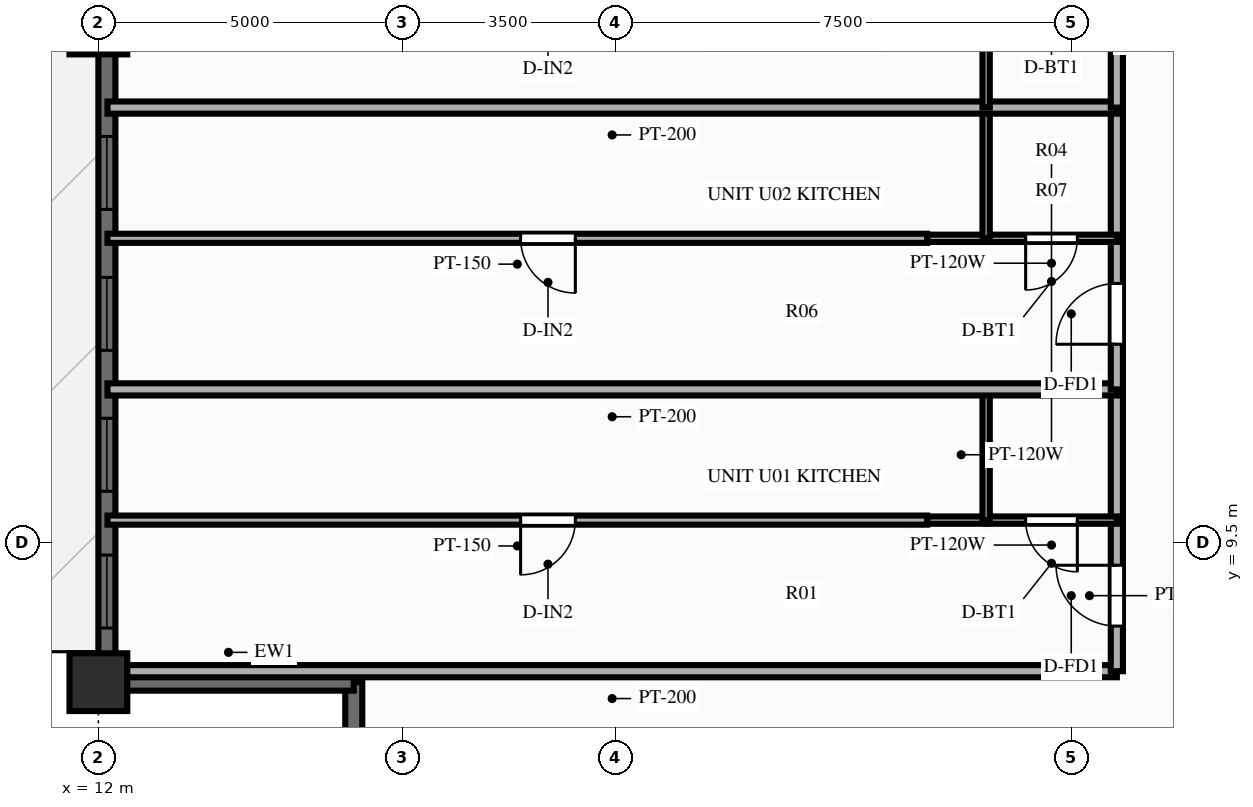
"""IFC4 building model, lengths in metres.
Left out: names, types, materials, properties, quantities, classifications, styles, units other than length and angle.
Written with IfcOpenShell. Run it as: python <this file> out.ifc"""

import sys

from ifc_helpers import new_model, si_unit, direction, frame, frame_2d, origin, origin_2d, place, context, subcontext, project, spatial, rectangle, extrude, source, transform, mapped, element, fill, save


model = new_model("IFC4")
c1 = context("Model", 3, precision=1e-05, world=origin(), true_north=direction((0.0, 1.0)))
c2 = subcontext(c1, "Body", "Model", "MODEL_VIEW")
j1 = project(units=[si_unit("LENGTHUNIT", "METRE"), si_unit("PLANEANGLEUNIT", "RADIAN")], contexts=[c1])
p1 = place(None, origin())
s1 = spatial("IfcSite", under=j1, at=p1, CompositionType="ELEMENT")
p2 = place(p1, origin())
s2 = spatial("IfcBuilding", under=s1, at=p2, CompositionType="ELEMENT")
p3 = place(p2, frame((0.0, 0.0, 122.85)))
s3 = spatial("IfcBuildingStorey", under=s2, at=p3, CompositionType="ELEMENT", Elevation=122.85)
m1 = source(origin(), c2, "Body", "SweptSolid", [
    extrude(rectangle(XDim=0.95, YDim=0.95, at=origin_2d()), origin(), (0.0, 0.0, 1.0), 3.9),
])
for number, where, z_axis, x_axis in (
    (1, (12.0, 18.0, 0.0), (0.0, 0.0, 1.0), (1.0, 0.0, 0.0)),
    (2, (12.0, 7.2, 0.0), (0.0, 0.0, 1.0), (1.0, 0.0, 0.0)),
):
    element("IfcColumn", number, at=place(p3, frame(where, z_axis=z_axis, x_axis=x_axis)), inside=s3, PredefinedType="COLUMN", context=c2, shape_type="MappedRepresentation", body=[
        mapped(m1, transform((0.0, 0.0, 0.0), scale=1.0)),
    ])
p4 = place(p3, frame((12.14, 7.2, 0.0), z_axis=(0.0, 0.0, 1.0), x_axis=(0.0, 1.0, 0.0)))
e3 = element("IfcWall", 3, at=p4, inside=s3, PredefinedType="SOLIDWALL", context=c2, shape_type="SweptSolid", body=[
    extrude(rectangle(XDim=39.6, YDim=0.28, at=frame_2d((19.8, 0.0))), origin(), (0.0, 0.0, 1.0), 2.24),
])
p5 = place(p4, frame((0.89, 0.0, 0.25)))
e4 = element("IfcOpeningElement", 4, at=p5, cuts=e3, PredefinedType="OPENING", context=c2, shape_type="SweptSolid", body=[
    extrude(rectangle(XDim=1.2, YDim=1.5, at=frame_2d((0.6, 0.75))), frame((0.0, 0.152, 0.0), z_axis=(0.0, -1.0, 0.0), x_axis=(1.0, 0.0, 0.0)), (0.0, 0.0, 1.0), 0.304),
])
p6 = place(p4, frame((3.14, 0.0, 0.25)))
e5 = element("IfcOpeningElement", 5, at=p6, cuts=e3, PredefinedType="OPENING", context=c2, shape_type="SweptSolid", body=[
    extrude(rectangle(XDim=1.2, YDim=1.5, at=frame_2d((0.6, 0.75))), frame((0.0, 0.152, 0.0), z_axis=(0.0, -1.0, 0.0), x_axis=(1.0, 0.0, 0.0)), (0.0, 0.0, 1.0), 0.304),
])
p7 = place(p4, frame((5.458, 0.0, 0.25)))
e6 = element("IfcOpeningElement", 6, at=p7, cuts=e3, PredefinedType="OPENING", context=c2, shape_type="SweptSolid", body=[
    extrude(rectangle(XDim=1.2, YDim=1.5, at=frame_2d((0.6, 0.75))), frame((0.0, 0.152, 0.0), z_axis=(0.0, -1.0, 0.0), x_axis=(1.0, 0.0, 0.0)), (0.0, 0.0, 1.0), 0.304),
])
p8 = place(p4, frame((7.775, 0.0, 0.25)))
e7 = element("IfcOpeningElement", 7, at=p8, cuts=e3, PredefinedType="OPENING", context=c2, shape_type="SweptSolid", body=[
    extrude(rectangle(XDim=1.2, YDim=1.5, at=frame_2d((0.6, 0.75))), frame((0.0, 0.152, 0.0), z_axis=(0.0, -1.0, 0.0), x_axis=(1.0, 0.0, 0.0)), (0.0, 0.0, 1.0), 0.304),
])
p9 = place(p4, frame((12.242, 0.0, 0.25)))
e8 = element("IfcOpeningElement", 8, at=p9, cuts=e3, PredefinedType="OPENING", context=c2, shape_type="SweptSolid", body=[
    extrude(rectangle(XDim=1.2, YDim=1.5, at=frame_2d((0.6, 0.75))), frame((0.0, 0.152, 0.0), z_axis=(0.0, -1.0, 0.0), x_axis=(1.0, 0.0, 0.0)), (0.0, 0.0, 1.0), 0.304),
])
p10 = place(p4, frame((14.56, 0.0, 0.25)))
e9 = element("IfcOpeningElement", 9, at=p10, cuts=e3, PredefinedType="OPENING", context=c2, shape_type="SweptSolid", body=[
    extrude(rectangle(XDim=1.2, YDim=1.5, at=frame_2d((0.6, 0.75))), frame((0.0, 0.152, 0.0), z_axis=(0.0, -1.0, 0.0), x_axis=(1.0, 0.0, 0.0)), (0.0, 0.0, 1.0), 0.304),
])
p11 = place(p4, frame((16.877, 0.0, 0.25)))
e10 = element("IfcOpeningElement", 10, at=p11, cuts=e3, PredefinedType="OPENING", context=c2, shape_type="SweptSolid", body=[
    extrude(rectangle(XDim=1.2, YDim=1.5, at=frame_2d((0.6, 0.75))), frame((0.0, 0.152, 0.0), z_axis=(0.0, -1.0, 0.0), x_axis=(1.0, 0.0, 0.0)), (0.0, 0.0, 1.0), 0.304),
])
p12 = place(p4, frame((19.25, 0.0, 0.0)))
e11 = element("IfcOpeningElement", 11, at=p12, cuts=e3, PredefinedType="OPENING", context=c2, shape_type="SweptSolid", body=[
    extrude(rectangle(XDim=1.1, YDim=2.15, at=frame_2d((0.55, 1.075))), frame((0.0, 0.152, 0.0), z_axis=(0.0, -1.0, 0.0), x_axis=(1.0, 0.0, 0.0)), (0.0, 0.0, 1.0), 0.304),
])
p13 = place(p4, frame((21.522, 0.0, 0.25)))
e12 = element("IfcOpeningElement", 12, at=p13, cuts=e3, PredefinedType="OPENING", context=c2, shape_type="SweptSolid", body=[
    extrude(rectangle(XDim=1.2, YDim=1.5, at=frame_2d((0.6, 0.75))), frame((0.0, 0.152, 0.0), z_axis=(0.0, -1.0, 0.0), x_axis=(1.0, 0.0, 0.0)), (0.0, 0.0, 1.0), 0.304),
])
p14 = place(p4, frame((23.84, 0.0, 0.25)))
e13 = element("IfcOpeningElement", 13, at=p14, cuts=e3, PredefinedType="OPENING", context=c2, shape_type="SweptSolid", body=[
    extrude(rectangle(XDim=1.2, YDim=1.5, at=frame_2d((0.6, 0.75))), frame((0.0, 0.152, 0.0), z_axis=(0.0, -1.0, 0.0), x_axis=(1.0, 0.0, 0.0)), (0.0, 0.0, 1.0), 0.304),
])
p15 = place(p4, frame((26.157, 0.0, 0.25)))
e14 = element("IfcOpeningElement", 14, at=p15, cuts=e3, PredefinedType="OPENING", context=c2, shape_type="SweptSolid", body=[
    extrude(rectangle(XDim=1.2, YDim=1.5, at=frame_2d((0.6, 0.75))), frame((0.0, 0.152, 0.0), z_axis=(0.0, -1.0, 0.0), x_axis=(1.0, 0.0, 0.0)), (0.0, 0.0, 1.0), 0.304),
])
p16 = place(p4, frame((30.625, 0.0, 0.25)))
e15 = element("IfcOpeningElement", 15, at=p16, cuts=e3, PredefinedType="OPENING", context=c2, shape_type="SweptSolid", body=[
    extrude(rectangle(XDim=1.2, YDim=1.5, at=frame_2d((0.6, 0.75))), frame((0.0, 0.152, 0.0), z_axis=(0.0, -1.0, 0.0), x_axis=(1.0, 0.0, 0.0)), (0.0, 0.0, 1.0), 0.304),
])
p17 = place(p4, frame((32.942, 0.0, 0.25)))
e16 = element("IfcOpeningElement", 16, at=p17, cuts=e3, PredefinedType="OPENING", context=c2, shape_type="SweptSolid", body=[
    extrude(rectangle(XDim=1.2, YDim=1.5, at=frame_2d((0.6, 0.75))), frame((0.0, 0.152, 0.0), z_axis=(0.0, -1.0, 0.0), x_axis=(1.0, 0.0, 0.0)), (0.0, 0.0, 1.0), 0.304),
])
p18 = place(p4, frame((35.26, 0.0, 0.25)))
e17 = element("IfcOpeningElement", 17, at=p18, cuts=e3, PredefinedType="OPENING", context=c2, shape_type="SweptSolid", body=[
    extrude(rectangle(XDim=1.2, YDim=1.5, at=frame_2d((0.6, 0.75))), frame((0.0, 0.152, 0.0), z_axis=(0.0, -1.0, 0.0), x_axis=(1.0, 0.0, 0.0)), (0.0, 0.0, 1.0), 0.304),
])
p19 = place(p4, frame((37.51, 0.0, 0.25)))
e18 = element("IfcOpeningElement", 18, at=p19, cuts=e3, PredefinedType="OPENING", context=c2, shape_type="SweptSolid", body=[
    extrude(rectangle(XDim=1.2, YDim=1.5, at=frame_2d((0.6, 0.75))), frame((0.0, 0.152, 0.0), z_axis=(0.0, -1.0, 0.0), x_axis=(1.0, 0.0, 0.0)), (0.0, 0.0, 1.0), 0.304),
])
for number, where, z_axis, x_axis in (
    (19, (16.2, 3.08, 0.0), (0.0, 0.0, 1.0), (0.0, 1.0, 0.0)),
    (20, (12.08, 7.2, 0.0), (0.0, 0.0, 1.0), (1.0, 0.0, 0.0)),
):
    element("IfcWall", number, at=place(p3, frame(where, z_axis=z_axis, x_axis=x_axis)), inside=s3, PredefinedType="SOLIDWALL", context=c2, shape_type="SweptSolid", body=[
        extrude(rectangle(XDim=4.12, YDim=0.28, at=frame_2d((2.06, 0.0))), origin(), (0.0, 0.0, 1.0), 2.24),
    ])
p20 = place(p3, frame((28.75, 7.38, 0.0), z_axis=(0.0, 0.0, 1.0), x_axis=(-1.0, 0.0, 0.0)))
e21 = element("IfcWall", 21, at=p20, inside=s3, PredefinedType="PARTITIONING", context=c2, shape_type="SweptSolid", body=[
    extrude(rectangle(XDim=16.6, YDim=0.2, at=frame_2d((8.3, 0.0))), origin(), (0.0, 0.0, 1.0), 3.56),
])
p21 = place(p3, frame((28.75, 7.38, 0.0), z_axis=(0.0, 0.0, 1.0), x_axis=(0.0, 1.0, 0.0)))
e22 = element("IfcWall", 22, at=p21, inside=s3, PredefinedType="PARTITIONING", context=c2, shape_type="SweptSolid", body=[
    extrude(rectangle(XDim=2.485, YDim=0.2, at=frame_2d((1.243, 0.0))), origin(), (0.0, 0.0, 1.0), 3.56),
])
p22 = place(p21, frame((0.742, 0.0, 0.0)))
e23 = element("IfcOpeningElement", 23, at=p22, cuts=e22, PredefinedType="OPENING", context=c2, shape_type="SweptSolid", body=[
    extrude(rectangle(XDim=1.0, YDim=2.15, at=frame_2d((0.5, 1.075))), frame((0.0, 0.112, 0.0), z_axis=(0.0, -1.0, 0.0), x_axis=(1.0, 0.0, 0.0)), (0.0, 0.0, 1.0), 0.224),
])
p23 = place(p3, frame((28.75, 9.865, 0.0), z_axis=(0.0, 0.0, 1.0), x_axis=(0.0, 1.0, 0.0)))
e24 = element("IfcWall", 24, at=p23, inside=s3, PredefinedType="PARTITIONING", context=c2, shape_type="SweptSolid", body=[
    extrude(rectangle(XDim=2.15, YDim=0.2, at=frame_2d((1.075, 0.0))), origin(), (0.0, 0.0, 1.0), 3.56),
])
p24 = place(p3, frame((28.75, 9.865, 0.0), z_axis=(0.0, 0.0, 1.0), x_axis=(-1.0, 0.0, 0.0)))
e25 = element("IfcWall", 25, at=p24, inside=s3, PredefinedType="PARTITIONING", context=c2, shape_type="SweptSolid", body=[
    extrude(rectangle(XDim=2.15, YDim=0.12, at=frame_2d((1.075, 0.0))), origin(), (0.0, 0.0, 1.0), 3.56),
])
p25 = place(p24, frame((0.65, 0.0, 0.0)))
e26 = element("IfcOpeningElement", 26, at=p25, cuts=e25, PredefinedType="OPENING", context=c2, shape_type="SweptSolid", body=[
    extrude(rectangle(XDim=0.85, YDim=2.05, at=frame_2d((0.425, 1.025))), frame((0.0, 0.072, 0.0), z_axis=(0.0, -1.0, 0.0), x_axis=(1.0, 0.0, 0.0)), (0.0, 0.0, 1.0), 0.144),
])
p26 = place(p3, frame((26.6, 9.865, 0.0), z_axis=(0.0, 0.0, 1.0), x_axis=(-1.0, 0.0, 0.0)))
e27 = element("IfcWall", 27, at=p26, inside=s3, PredefinedType="PARTITIONING", context=c2, shape_type="SweptSolid", body=[
    extrude(rectangle(XDim=0.97, YDim=0.12, at=frame_2d((0.485, 0.0))), origin(), (0.0, 0.0, 1.0), 3.56),
])
p27 = place(p3, frame((26.6, 9.865, 0.0), z_axis=(0.0, 0.0, 1.0), x_axis=(0.0, 1.0, 0.0)))
e28 = element("IfcWall", 28, at=p27, inside=s3, PredefinedType="PARTITIONING", context=c2, shape_type="SweptSolid", body=[
    extrude(rectangle(XDim=2.15, YDim=0.12, at=frame_2d((1.075, 0.0))), origin(), (0.0, 0.0, 1.0), 3.56),
])
p28 = place(p3, frame((25.63, 9.865, 0.0), z_axis=(0.0, 0.0, 1.0), x_axis=(-1.0, 0.0, 0.0)))
e29 = element("IfcWall", 29, at=p28, inside=s3, PredefinedType="PARTITIONING", context=c2, shape_type="SweptSolid", body=[
    extrude(rectangle(XDim=13.48, YDim=0.15, at=frame_2d((6.74, 0.0))), origin(), (0.0, 0.0, 1.0), 3.56),
])
p29 = place(p28, frame((5.786, 0.0, 0.0)))
e30 = element("IfcOpeningElement", 30, at=p29, cuts=e29, PredefinedType="OPENING", context=c2, shape_type="SweptSolid", body=[
    extrude(rectangle(XDim=0.9, YDim=2.1, at=frame_2d((0.45, 1.05))), frame((0.0, 0.087, 0.0), z_axis=(0.0, -1.0, 0.0), x_axis=(1.0, 0.0, 0.0)), (0.0, 0.0, 1.0), 0.174),
])
p30 = place(p3, frame((28.75, 12.015, 0.0), z_axis=(0.0, 0.0, 1.0), x_axis=(-1.0, 0.0, 0.0)))
e31 = element("IfcWall", 31, at=p30, inside=s3, PredefinedType="PARTITIONING", context=c2, shape_type="SweptSolid", body=[
    extrude(rectangle(XDim=16.6, YDim=0.2, at=frame_2d((8.3, 0.0))), origin(), (0.0, 0.0, 1.0), 3.56),
])
p31 = place(p3, frame((28.75, 12.015, 0.0), z_axis=(0.0, 0.0, 1.0), x_axis=(0.0, 1.0, 0.0)))
e32 = element("IfcWall", 32, at=p31, inside=s3, PredefinedType="PARTITIONING", context=c2, shape_type="SweptSolid", body=[
    extrude(rectangle(XDim=2.485, YDim=0.2, at=frame_2d((1.243, 0.0))), origin(), (0.0, 0.0, 1.0), 3.56),
])
p32 = place(p31, frame((0.742, 0.0, 0.0)))
e33 = element("IfcOpeningElement", 33, at=p32, cuts=e32, PredefinedType="OPENING", context=c2, shape_type="SweptSolid", body=[
    extrude(rectangle(XDim=1.0, YDim=2.15, at=frame_2d((0.5, 1.075))), frame((0.0, 0.112, 0.0), z_axis=(0.0, -1.0, 0.0), x_axis=(1.0, 0.0, 0.0)), (0.0, 0.0, 1.0), 0.224),
])
p33 = place(p3, frame((28.75, 14.5, 0.0), z_axis=(0.0, 0.0, 1.0), x_axis=(0.0, 1.0, 0.0)))
e34 = element("IfcWall", 34, at=p33, inside=s3, PredefinedType="PARTITIONING", context=c2, shape_type="SweptSolid", body=[
    extrude(rectangle(XDim=2.15, YDim=0.2, at=frame_2d((1.075, 0.0))), origin(), (0.0, 0.0, 1.0), 3.56),
])
p34 = place(p3, frame((28.75, 14.5, 0.0), z_axis=(0.0, 0.0, 1.0), x_axis=(-1.0, 0.0, 0.0)))
e35 = element("IfcWall", 35, at=p34, inside=s3, PredefinedType="PARTITIONING", context=c2, shape_type="SweptSolid", body=[
    extrude(rectangle(XDim=2.15, YDim=0.12, at=frame_2d((1.075, 0.0))), origin(), (0.0, 0.0, 1.0), 3.56),
])
p35 = place(p34, frame((0.65, 0.0, 0.0)))
e36 = element("IfcOpeningElement", 36, at=p35, cuts=e35, PredefinedType="OPENING", context=c2, shape_type="SweptSolid", body=[
    extrude(rectangle(XDim=0.85, YDim=2.05, at=frame_2d((0.425, 1.025))), frame((0.0, 0.072, 0.0), z_axis=(0.0, -1.0, 0.0), x_axis=(1.0, 0.0, 0.0)), (0.0, 0.0, 1.0), 0.144),
])
p36 = place(p3, frame((26.6, 14.5, 0.0), z_axis=(0.0, 0.0, 1.0), x_axis=(-1.0, 0.0, 0.0)))
e37 = element("IfcWall", 37, at=p36, inside=s3, PredefinedType="PARTITIONING", context=c2, shape_type="SweptSolid", body=[
    extrude(rectangle(XDim=0.97, YDim=0.12, at=frame_2d((0.485, 0.0))), origin(), (0.0, 0.0, 1.0), 3.56),
])
p37 = place(p3, frame((26.6, 14.5, 0.0), z_axis=(0.0, 0.0, 1.0), x_axis=(0.0, 1.0, 0.0)))
e38 = element("IfcWall", 38, at=p37, inside=s3, PredefinedType="PARTITIONING", context=c2, shape_type="SweptSolid", body=[
    extrude(rectangle(XDim=2.15, YDim=0.12, at=frame_2d((1.075, 0.0))), origin(), (0.0, 0.0, 1.0), 3.56),
])
p38 = place(p3, frame((25.63, 14.5, 0.0), z_axis=(0.0, 0.0, 1.0), x_axis=(-1.0, 0.0, 0.0)))
e39 = element("IfcWall", 39, at=p38, inside=s3, PredefinedType="PARTITIONING", context=c2, shape_type="SweptSolid", body=[
    extrude(rectangle(XDim=13.48, YDim=0.15, at=frame_2d((6.74, 0.0))), origin(), (0.0, 0.0, 1.0), 3.56),
])
p39 = place(p38, frame((5.786, 0.0, 0.0)))
e40 = element("IfcOpeningElement", 40, at=p39, cuts=e39, PredefinedType="OPENING", context=c2, shape_type="SweptSolid", body=[
    extrude(rectangle(XDim=0.9, YDim=2.1, at=frame_2d((0.45, 1.05))), frame((0.0, 0.087, 0.0), z_axis=(0.0, -1.0, 0.0), x_axis=(1.0, 0.0, 0.0)), (0.0, 0.0, 1.0), 0.174),
])
p40 = place(p3, frame((28.75, 16.65, 0.0), z_axis=(0.0, 0.0, 1.0), x_axis=(-1.0, 0.0, 0.0)))
e41 = element("IfcWall", 41, at=p40, inside=s3, PredefinedType="PARTITIONING", context=c2, shape_type="SweptSolid", body=[
    extrude(rectangle(XDim=16.6, YDim=0.2, at=frame_2d((8.3, 0.0))), origin(), (0.0, 0.0, 1.0), 3.56),
])
p41 = place(p3, frame((28.75, 16.65, 0.0), z_axis=(0.0, 0.0, 1.0), x_axis=(0.0, 1.0, 0.0)))
e42 = element("IfcWall", 42, at=p41, inside=s3, PredefinedType="PARTITIONING", context=c2, shape_type="SweptSolid", body=[
    extrude(rectangle(XDim=2.15, YDim=0.2, at=frame_2d((1.075, 0.0))), origin(), (0.0, 0.0, 1.0), 3.56),
])
p42 = place(p3, frame((26.6, 16.65, 0.0), z_axis=(0.0, 0.0, 1.0), x_axis=(0.0, 1.0, 0.0)))
e43 = element("IfcWall", 43, at=p42, inside=s3, PredefinedType="PARTITIONING", context=c2, shape_type="SweptSolid", body=[
    extrude(rectangle(XDim=2.15, YDim=0.12, at=frame_2d((1.075, 0.0))), origin(), (0.0, 0.0, 1.0), 3.56),
])
m2 = source(origin(), c2, "Body", "SweptSolid", [
    extrude(rectangle(XDim=1.2, YDim=1.5, at=frame_2d((0.6, 0.75))), frame((0.0, 0.03, 0.0), z_axis=(0.0, -1.0, 0.0), x_axis=(1.0, 0.0, 0.0)), (0.0, 0.0, 1.0), 0.06),
])
p43 = place(p5, origin())
e44 = element("IfcWindow", 44, at=p43, inside=s3, PartitioningType="SINGLE_PANEL", PredefinedType="WINDOW", context=c2, shape_type="MappedRepresentation", body=[
    mapped(m2, transform((0.0, 0.0, 0.0), scale=1.0)),
])
fill(e4, e44)
p44 = place(p6, origin())
e45 = element("IfcWindow", 45, at=p44, inside=s3, PartitioningType="SINGLE_PANEL", PredefinedType="WINDOW", context=c2, shape_type="MappedRepresentation", body=[
    mapped(m2, transform((0.0, 0.0, 0.0), scale=1.0)),
])
fill(e5, e45)
p45 = place(p7, origin())
e46 = element("IfcWindow", 46, at=p45, inside=s3, PartitioningType="SINGLE_PANEL", PredefinedType="WINDOW", context=c2, shape_type="MappedRepresentation", body=[
    mapped(m2, transform((0.0, 0.0, 0.0), scale=1.0)),
])
fill(e6, e46)
p46 = place(p8, origin())
e47 = element("IfcWindow", 47, at=p46, inside=s3, PartitioningType="SINGLE_PANEL", PredefinedType="WINDOW", context=c2, shape_type="MappedRepresentation", body=[
    mapped(m2, transform((0.0, 0.0, 0.0), scale=1.0)),
])
fill(e7, e47)
m3 = source(origin(), c2, "Body", "SweptSolid", [
    extrude(rectangle(XDim=1.0, YDim=2.15, at=frame_2d((0.5, 1.075))), frame((0.0, 0.025, 0.0), z_axis=(0.0, -1.0, 0.0), x_axis=(1.0, 0.0, 0.0)), (0.0, 0.0, 1.0), 0.05),
])
p47 = place(p22, origin())
e48 = element("IfcDoor", 48, at=p47, inside=s3, OperationType="SINGLE_SWING_RIGHT", PredefinedType="DOOR", context=c2, shape_type="MappedRepresentation", body=[
    mapped(m3, transform((0.0, 0.0, 0.0), scale=1.0)),
])
fill(e23, e48)
m4 = source(origin(), c2, "Body", "SweptSolid", [
    extrude(rectangle(XDim=0.85, YDim=2.05, at=frame_2d((0.425, 1.025))), frame((0.0, 0.025, 0.0), z_axis=(0.0, -1.0, 0.0), x_axis=(1.0, 0.0, 0.0)), (0.0, 0.0, 1.0), 0.05),
])
p48 = place(p25, origin())
e49 = element("IfcDoor", 49, at=p48, inside=s3, OperationType="SINGLE_SWING_LEFT", PredefinedType="DOOR", context=c2, shape_type="MappedRepresentation", body=[
    mapped(m4, transform((0.0, 0.0, 0.0), scale=1.0)),
])
fill(e26, e49)
m5 = source(origin(), c2, "Body", "SweptSolid", [
    extrude(rectangle(XDim=0.9, YDim=2.1, at=frame_2d((0.45, 1.05))), frame((0.0, 0.025, 0.0), z_axis=(0.0, -1.0, 0.0), x_axis=(1.0, 0.0, 0.0)), (0.0, 0.0, 1.0), 0.05),
])
p49 = place(p29, origin())
e50 = element("IfcDoor", 50, at=p49, inside=s3, OperationType="SINGLE_SWING_RIGHT", PredefinedType="DOOR", context=c2, shape_type="MappedRepresentation", body=[
    mapped(m5, transform((0.0, 0.0, 0.0), scale=1.0)),
])
fill(e30, e50)
p50 = place(p32, origin())
e51 = element("IfcDoor", 51, at=p50, inside=s3, OperationType="SINGLE_SWING_LEFT", PredefinedType="DOOR", context=c2, shape_type="MappedRepresentation", body=[
    mapped(m3, transform((0.0, 0.0, 0.0), scale=1.0)),
])
fill(e33, e51)
p51 = place(p35, origin())
e52 = element("IfcDoor", 52, at=p51, inside=s3, OperationType="SINGLE_SWING_RIGHT", PredefinedType="DOOR", context=c2, shape_type="MappedRepresentation", body=[
    mapped(m4, transform((0.0, 0.0, 0.0), scale=1.0)),
])
fill(e36, e52)
p52 = place(p39, origin())
e53 = element("IfcDoor", 53, at=p52, inside=s3, OperationType="SINGLE_SWING_LEFT", PredefinedType="DOOR", context=c2, shape_type="MappedRepresentation", body=[
    mapped(m5, transform((0.0, 0.0, 0.0), scale=1.0)),
])
fill(e40, e53)
save(model, sys.argv[1])
